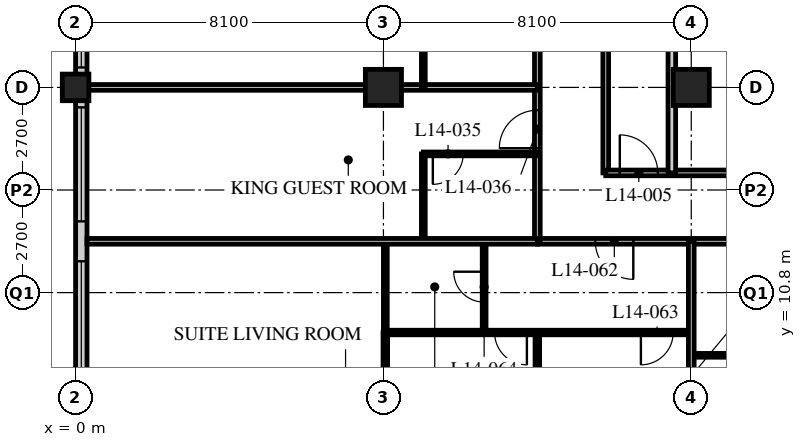
"""IFC4 building model, lengths in metres.
Left out: names, types, materials, properties, quantities, classifications, styles, units other than length and angle.
Written with IfcOpenShell. Run it as: python <this file> out.ifc"""

import sys

from ifc_helpers import new_model, si_unit, direction, frame, frame_2d, origin, origin_2d, place, context, subcontext, project, spatial, rectangle, hollow_rectangle, extrude, element, fill, save


model = new_model("IFC4")
c1 = context("Model", 3, precision=1e-05, world=origin(), true_north=direction((0.0, 1.0)))
c2 = subcontext(c1, "Body", "Model", "MODEL_VIEW")
j1 = project(units=[si_unit("LENGTHUNIT", "METRE"), si_unit("PLANEANGLEUNIT", "RADIAN")], contexts=[c1])
p1 = place(None, origin())
s1 = spatial("IfcSite", under=j1, at=p1, CompositionType="ELEMENT")
p2 = place(p1, origin())
s2 = spatial("IfcBuilding", under=s1, at=p2, CompositionType="ELEMENT")
p3 = place(p2, frame((0.0, 0.0, 60.2)))
s3 = spatial("IfcBuildingStorey", under=s2, at=p3, CompositionType="ELEMENT", Elevation=60.2)
p4 = place(p3, frame((0.0, 16.2, 0.0), z_axis=(0.0, 0.0, 1.0), x_axis=(1.0, 0.0, 0.0)))
e1 = element("IfcColumn", 1, at=p4, inside=s3, PredefinedType="COLUMN", context=c2, shape_type="SweptSolid", body=[
    extrude(hollow_rectangle(XDim=0.7, YDim=0.7, WallThickness=0.06, at=origin_2d()), origin(), (0.0, 0.0, 1.0), 3.4),
])
for number, where, z_axis, x_axis in (
    (2, (8.1, 16.2, 0.0), (0.0, 0.0, 1.0), (1.0, 0.0, 0.0)),
    (3, (16.2, 16.2, 0.0), (0.0, 0.0, 1.0), (1.0, 0.0, 0.0)),
):
    element("IfcColumn", number, at=place(p3, frame(where, z_axis=z_axis, x_axis=x_axis)), inside=s3, PredefinedType="COLUMN", context=c2, shape_type="SweptSolid", body=[
        extrude(hollow_rectangle(XDim=0.95, YDim=0.95, WallThickness=0.095, at=origin_2d()), origin(), (0.0, 0.0, 1.0), 3.4),
    ])
p5 = place(p3, frame((0.15, 40.2, 0.0), z_axis=(0.0, 0.0, 1.0), x_axis=(0.0, -1.0, 0.0)))
e4 = element("IfcWall", 4, at=p5, inside=s3, PredefinedType="SOLIDWALL", context=c2, shape_type="SweptSolid", body=[
    extrude(rectangle(XDim=32.1, YDim=0.3, at=frame_2d((16.05, 0.0))), origin(), (0.0, 0.0, 1.0), 3.19),
])
p6 = place(p5, frame((0.225, 0.0, 0.9)))
e5 = element("IfcOpeningElement", 5, at=p6, cuts=e4, PredefinedType="OPENING", context=c2, shape_type="SweptSolid", body=[
    extrude(rectangle(XDim=3.0, YDim=2.0, at=frame_2d((1.5, 1.0))), frame((0.0, 0.16, 0.0), z_axis=(0.0, -1.0, 0.0), x_axis=(1.0, 0.0, 0.0)), (0.0, 0.0, 1.0), 0.32),
])
p7 = place(p5, frame((4.275, 0.0, 0.9)))
e6 = element("IfcOpeningElement", 6, at=p7, cuts=e4, PredefinedType="OPENING", context=c2, shape_type="SweptSolid", body=[
    extrude(rectangle(XDim=3.0, YDim=2.0, at=frame_2d((1.5, 1.0))), frame((0.0, 0.16, 0.0), z_axis=(0.0, -1.0, 0.0), x_axis=(1.0, 0.0, 0.0)), (0.0, 0.0, 1.0), 0.32),
])
p8 = place(p5, frame((8.325, 0.0, 0.9)))
e7 = element("IfcOpeningElement", 7, at=p8, cuts=e4, PredefinedType="OPENING", context=c2, shape_type="SweptSolid", body=[
    extrude(rectangle(XDim=3.0, YDim=2.0, at=frame_2d((1.5, 1.0))), frame((0.0, 0.16, 0.0), z_axis=(0.0, -1.0, 0.0), x_axis=(1.0, 0.0, 0.0)), (0.0, 0.0, 1.0), 0.32),
])
p9 = place(p5, frame((12.375, 0.0, 0.9)))
e8 = element("IfcOpeningElement", 8, at=p9, cuts=e4, PredefinedType="OPENING", context=c2, shape_type="SweptSolid", body=[
    extrude(rectangle(XDim=3.0, YDim=2.0, at=frame_2d((1.5, 1.0))), frame((0.0, 0.16, 0.0), z_axis=(0.0, -1.0, 0.0), x_axis=(1.0, 0.0, 0.0)), (0.0, 0.0, 1.0), 0.32),
])
p10 = place(p5, frame((16.425, 0.0, 0.9)))
e9 = element("IfcOpeningElement", 9, at=p10, cuts=e4, PredefinedType="OPENING", context=c2, shape_type="SweptSolid", body=[
    extrude(rectangle(XDim=3.0, YDim=2.0, at=frame_2d((1.5, 1.0))), frame((0.0, 0.16, 0.0), z_axis=(0.0, -1.0, 0.0), x_axis=(1.0, 0.0, 0.0)), (0.0, 0.0, 1.0), 0.32),
])
p11 = place(p5, frame((20.475, 0.0, 0.9)))
e10 = element("IfcOpeningElement", 10, at=p11, cuts=e4, PredefinedType="OPENING", context=c2, shape_type="SweptSolid", body=[
    extrude(rectangle(XDim=3.0, YDim=2.0, at=frame_2d((1.5, 1.0))), frame((0.0, 0.16, 0.0), z_axis=(0.0, -1.0, 0.0), x_axis=(1.0, 0.0, 0.0)), (0.0, 0.0, 1.0), 0.32),
])
p12 = place(p5, frame((24.525, 0.0, 0.9)))
e11 = element("IfcOpeningElement", 11, at=p12, cuts=e4, PredefinedType="OPENING", context=c2, shape_type="SweptSolid", body=[
    extrude(rectangle(XDim=3.0, YDim=2.0, at=frame_2d((1.5, 1.0))), frame((0.0, 0.16, 0.0), z_axis=(0.0, -1.0, 0.0), x_axis=(1.0, 0.0, 0.0)), (0.0, 0.0, 1.0), 0.32),
])
p13 = place(p5, frame((28.575, 0.0, 0.9)))
e12 = element("IfcOpeningElement", 12, at=p13, cuts=e4, PredefinedType="OPENING", context=c2, shape_type="SweptSolid", body=[
    extrude(rectangle(XDim=3.0, YDim=2.0, at=frame_2d((1.5, 1.0))), frame((0.0, 0.16, 0.0), z_axis=(0.0, -1.0, 0.0), x_axis=(1.0, 0.0, 0.0)), (0.0, 0.0, 1.0), 0.32),
])
p14 = place(p3, frame((12.15, 12.15, 0.0), z_axis=(0.0, 0.0, 1.0), x_axis=(1.0, 0.0, 0.0)))
e13 = element("IfcWall", 13, at=p14, inside=s3, PredefinedType="PARTITIONING", context=c2, shape_type="SweptSolid", body=[
    extrude(rectangle(XDim=32.4, YDim=0.15, at=frame_2d((16.2, 0.0))), origin(), (0.0, 0.0, 1.0), 3.19),
])
p15 = place(p14, frame((6.5, 0.0, 0.0)))
e14 = element("IfcOpeningElement", 14, at=p15, cuts=e13, PredefinedType="OPENING", context=c2, shape_type="SweptSolid", body=[
    extrude(rectangle(XDim=1.0, YDim=2.1, at=frame_2d((0.5, 1.05))), frame((0.0, 0.085, 0.0), z_axis=(0.0, -1.0, 0.0), x_axis=(1.0, 0.0, 0.0)), (0.0, 0.0, 1.0), 0.17),
])
p16 = place(p14, frame((8.4, 0.0, 0.0)))
e15 = element("IfcOpeningElement", 15, at=p16, cuts=e13, PredefinedType="OPENING", context=c2, shape_type="SweptSolid", body=[
    extrude(rectangle(XDim=1.0, YDim=2.1, at=frame_2d((0.5, 1.05))), frame((0.0, 0.085, 0.0), z_axis=(0.0, -1.0, 0.0), x_axis=(1.0, 0.0, 0.0)), (0.0, 0.0, 1.0), 0.17),
])
p17 = place(p14, frame((14.6, 0.0, 0.0)))
e16 = element("IfcOpeningElement", 16, at=p17, cuts=e13, PredefinedType="OPENING", context=c2, shape_type="SweptSolid", body=[
    extrude(rectangle(XDim=1.0, YDim=2.1, at=frame_2d((0.5, 1.05))), frame((0.0, 0.085, 0.0), z_axis=(0.0, -1.0, 0.0), x_axis=(1.0, 0.0, 0.0)), (0.0, 0.0, 1.0), 0.17),
])
p18 = place(p14, frame((18.65, 0.0, 0.0)))
e17 = element("IfcOpeningElement", 17, at=p18, cuts=e13, PredefinedType="OPENING", context=c2, shape_type="SweptSolid", body=[
    extrude(rectangle(XDim=1.0, YDim=2.1, at=frame_2d((0.5, 1.05))), frame((0.0, 0.085, 0.0), z_axis=(0.0, -1.0, 0.0), x_axis=(1.0, 0.0, 0.0)), (0.0, 0.0, 1.0), 0.17),
])
p19 = place(p14, frame((20.55, 0.0, 0.0)))
e18 = element("IfcOpeningElement", 18, at=p19, cuts=e13, PredefinedType="OPENING", context=c2, shape_type="SweptSolid", body=[
    extrude(rectangle(XDim=1.0, YDim=2.1, at=frame_2d((0.5, 1.05))), frame((0.0, 0.085, 0.0), z_axis=(0.0, -1.0, 0.0), x_axis=(1.0, 0.0, 0.0)), (0.0, 0.0, 1.0), 0.17),
])
p20 = place(p14, frame((26.75, 0.0, 0.0)))
e19 = element("IfcOpeningElement", 19, at=p20, cuts=e13, PredefinedType="OPENING", context=c2, shape_type="SweptSolid", body=[
    extrude(rectangle(XDim=1.0, YDim=2.1, at=frame_2d((0.5, 1.05))), frame((0.0, 0.085, 0.0), z_axis=(0.0, -1.0, 0.0), x_axis=(1.0, 0.0, 0.0)), (0.0, 0.0, 1.0), 0.17),
])
p21 = place(p14, frame((1.525, 0.0, 0.0)))
e20 = element("IfcOpeningElement", 20, at=p21, cuts=e13, PredefinedType="OPENING", context=c2, shape_type="SweptSolid", body=[
    extrude(rectangle(XDim=1.0, YDim=2.1, at=frame_2d((0.5, 1.05))), frame((0.0, 0.085, 0.0), z_axis=(0.0, -1.0, 0.0), x_axis=(1.0, 0.0, 0.0)), (0.0, 0.0, 1.0), 0.17),
])
p22 = place(p14, frame((29.875, 0.0, 0.0)))
e21 = element("IfcOpeningElement", 21, at=p22, cuts=e13, PredefinedType="OPENING", context=c2, shape_type="SweptSolid", body=[
    extrude(rectangle(XDim=1.0, YDim=2.1, at=frame_2d((0.5, 1.05))), frame((0.0, 0.085, 0.0), z_axis=(0.0, -1.0, 0.0), x_axis=(1.0, 0.0, 0.0)), (0.0, 0.0, 1.0), 0.17),
])
p23 = place(p3, frame((12.15, 12.15, 0.0), z_axis=(0.0, 0.0, 1.0), x_axis=(0.0, 1.0, 0.0)))
e22 = element("IfcWall", 22, at=p23, inside=s3, PredefinedType="PARTITIONING", context=c2, shape_type="SweptSolid", body=[
    extrude(rectangle(XDim=30.15, YDim=0.15, at=frame_2d((15.075, 0.0))), origin(), (0.0, 0.0, 1.0), 3.19),
])
p24 = place(p23, frame((2.45, 0.0, 0.0)))
e23 = element("IfcOpeningElement", 23, at=p24, cuts=e22, PredefinedType="OPENING", context=c2, shape_type="SweptSolid", body=[
    extrude(rectangle(XDim=1.0, YDim=2.1, at=frame_2d((0.5, 1.05))), frame((0.0, 0.085, 0.0), z_axis=(0.0, -1.0, 0.0), x_axis=(1.0, 0.0, 0.0)), (0.0, 0.0, 1.0), 0.17),
])
p25 = place(p23, frame((6.5, 0.0, 0.0)))
e24 = element("IfcOpeningElement", 24, at=p25, cuts=e22, PredefinedType="OPENING", context=c2, shape_type="SweptSolid", body=[
    extrude(rectangle(XDim=1.0, YDim=2.1, at=frame_2d((0.5, 1.05))), frame((0.0, 0.085, 0.0), z_axis=(0.0, -1.0, 0.0), x_axis=(1.0, 0.0, 0.0)), (0.0, 0.0, 1.0), 0.17),
])
p26 = place(p23, frame((10.55, 0.0, 0.0)))
e25 = element("IfcOpeningElement", 25, at=p26, cuts=e22, PredefinedType="OPENING", context=c2, shape_type="SweptSolid", body=[
    extrude(rectangle(XDim=1.0, YDim=2.1, at=frame_2d((0.5, 1.05))), frame((0.0, 0.085, 0.0), z_axis=(0.0, -1.0, 0.0), x_axis=(1.0, 0.0, 0.0)), (0.0, 0.0, 1.0), 0.17),
])
p27 = place(p23, frame((14.6, 0.0, 0.0)))
e26 = element("IfcOpeningElement", 26, at=p27, cuts=e22, PredefinedType="OPENING", context=c2, shape_type="SweptSolid", body=[
    extrude(rectangle(XDim=1.0, YDim=2.1, at=frame_2d((0.5, 1.05))), frame((0.0, 0.085, 0.0), z_axis=(0.0, -1.0, 0.0), x_axis=(1.0, 0.0, 0.0)), (0.0, 0.0, 1.0), 0.17),
])
p28 = place(p23, frame((21.65, 0.0, 0.0)))
e27 = element("IfcOpeningElement", 27, at=p28, cuts=e22, PredefinedType="OPENING", context=c2, shape_type="SweptSolid", body=[
    extrude(rectangle(XDim=1.0, YDim=2.1, at=frame_2d((0.5, 1.05))), frame((0.0, 0.085, 0.0), z_axis=(0.0, -1.0, 0.0), x_axis=(1.0, 0.0, 0.0)), (0.0, 0.0, 1.0), 0.17),
])
p29 = place(p23, frame((26.7, 0.0, 0.0)))
e28 = element("IfcOpeningElement", 28, at=p29, cuts=e22, PredefinedType="OPENING", context=c2, shape_type="SweptSolid", body=[
    extrude(rectangle(XDim=1.0, YDim=2.1, at=frame_2d((0.5, 1.05))), frame((0.0, 0.085, 0.0), z_axis=(0.0, -1.0, 0.0), x_axis=(1.0, 0.0, 0.0)), (0.0, 0.0, 1.0), 0.17),
])
p30 = place(p3, frame((13.95, 40.5, 0.0), z_axis=(0.0, 0.0, 1.0), x_axis=(0.0, -1.0, 0.0)))
e29 = element("IfcWall", 29, at=p30, inside=s3, PredefinedType="PARTITIONING", context=c2, shape_type="SweptSolid", body=[
    extrude(rectangle(XDim=26.55, YDim=0.15, at=frame_2d((13.275, 0.0))), origin(), (0.0, 0.0, 1.0), 3.19),
])
p31 = place(p30, frame((11.65, 0.0, 0.0)))
e30 = element("IfcOpeningElement", 30, at=p31, cuts=e29, PredefinedType="OPENING", context=c2, shape_type="SweptSolid", body=[
    extrude(rectangle(XDim=1.0, YDim=2.1, at=frame_2d((0.5, 1.05))), frame((0.0, 0.085, 0.0), z_axis=(0.0, -1.0, 0.0), x_axis=(1.0, 0.0, 0.0)), (0.0, 0.0, 1.0), 0.17),
])
p32 = place(p30, frame((3.55, 0.0, 0.0)))
e31 = element("IfcOpeningElement", 31, at=p32, cuts=e29, PredefinedType="OPENING", context=c2, shape_type="SweptSolid", body=[
    extrude(rectangle(XDim=1.0, YDim=2.1, at=frame_2d((0.5, 1.05))), frame((0.0, 0.085, 0.0), z_axis=(0.0, -1.0, 0.0), x_axis=(1.0, 0.0, 0.0)), (0.0, 0.0, 1.0), 0.17),
])
p33 = place(p3, frame((13.95, 13.95, 0.0), z_axis=(0.0, 0.0, 1.0), x_axis=(1.0, 0.0, 0.0)))
e32 = element("IfcWall", 32, at=p33, inside=s3, PredefinedType="PARTITIONING", context=c2, shape_type="SweptSolid", body=[
    extrude(rectangle(XDim=13.19, YDim=0.15, at=frame_2d((6.595, 0.0))), origin(), (0.0, 0.0, 1.0), 3.19),
])
p34 = place(p33, frame((0.37, 0.0, 0.0)))
e33 = element("IfcOpeningElement", 33, at=p34, cuts=e32, PredefinedType="OPENING", context=c2, shape_type="SweptSolid", body=[
    extrude(rectangle(XDim=1.0, YDim=2.1, at=frame_2d((0.5, 1.05))), frame((0.0, 0.085, 0.0), z_axis=(0.0, -1.0, 0.0), x_axis=(1.0, 0.0, 0.0)), (0.0, 0.0, 1.0), 0.17),
])
p35 = place(p33, frame((4.104, 0.0, 0.0)))
e34 = element("IfcOpeningElement", 34, at=p35, cuts=e32, PredefinedType="OPENING", context=c2, shape_type="SweptSolid", body=[
    extrude(rectangle(XDim=1.0, YDim=2.1, at=frame_2d((0.5, 1.05))), frame((0.0, 0.085, 0.0), z_axis=(0.0, -1.0, 0.0), x_axis=(1.0, 0.0, 0.0)), (0.0, 0.0, 1.0), 0.17),
])
p36 = place(p33, frame((9.835, 0.0, 0.0)))
e35 = element("IfcOpeningElement", 35, at=p36, cuts=e32, PredefinedType="OPENING", context=c2, shape_type="SweptSolid", body=[
    extrude(rectangle(XDim=1.0, YDim=2.1, at=frame_2d((0.5, 1.05))), frame((0.0, 0.085, 0.0), z_axis=(0.0, -1.0, 0.0), x_axis=(1.0, 0.0, 0.0)), (0.0, 0.0, 1.0), 0.17),
])
p37 = place(p3, frame((15.689, 13.95, 0.0), z_axis=(0.0, 0.0, 1.0), x_axis=(0.0, 1.0, 0.0)))
e36 = element("IfcWall", 36, at=p37, inside=s3, PredefinedType="SOLIDWALL", context=c2, shape_type="SweptSolid", body=[
    extrude(rectangle(XDim=10.35, YDim=0.2, at=frame_2d((5.175, 0.0))), origin(), (0.0, 0.0, 1.0), 3.19),
])
for number, where, z_axis, x_axis in (
    (37, (16.2, 9.15, 0.0), (0.0, 0.0, 1.0), (1.0, 0.0, 0.0)),
    (38, (9.15, 12.15, 0.0), (0.0, 0.0, 1.0), (0.0, 1.0, 0.0)),
):
    element("IfcWall", number, at=place(p3, frame(where, z_axis=z_axis, x_axis=x_axis)), inside=s3, PredefinedType="PARTITIONING", context=c2, shape_type="SweptSolid", body=[
        extrude(rectangle(XDim=2.3, YDim=0.1, at=frame_2d((1.15, 0.0))), origin(), (0.0, 0.0, 1.0), 3.19),
    ])
p38 = place(p3, frame((12.15, 14.45, 0.0), z_axis=(0.0, 0.0, 1.0), x_axis=(-1.0, 0.0, 0.0)))
e39 = element("IfcWall", 39, at=p38, inside=s3, PredefinedType="PARTITIONING", context=c2, shape_type="SweptSolid", body=[
    extrude(rectangle(XDim=3.0, YDim=0.1, at=frame_2d((1.5, 0.0))), origin(), (0.0, 0.0, 1.0), 3.19),
])
p39 = place(p38, frame((1.95, 0.0, 0.0)))
e40 = element("IfcOpeningElement", 40, at=p39, cuts=e39, PredefinedType="OPENING", context=c2, shape_type="SweptSolid", body=[
    extrude(rectangle(XDim=0.8, YDim=2.1, at=frame_2d((0.4, 1.05))), frame((0.0, 0.06, 0.0), z_axis=(0.0, -1.0, 0.0), x_axis=(1.0, 0.0, 0.0)), (0.0, 0.0, 1.0), 0.12),
])
p40 = place(p3, frame((12.15, 16.2, 0.0), z_axis=(0.0, 0.0, 1.0), x_axis=(-1.0, 0.0, 0.0)))
e41 = element("IfcWall", 41, at=p40, inside=s3, PredefinedType="PARTITIONING", context=c2, shape_type="SweptSolid", body=[
    extrude(rectangle(XDim=11.85, YDim=0.15, at=frame_2d((5.925, 0.0))), origin(), (0.0, 0.0, 1.0), 2.578),
])
p41 = place(p3, frame((9.15, 16.2, 0.0), z_axis=(0.0, 0.0, 1.0), x_axis=(0.0, 1.0, 0.0)))
e42 = element("IfcWall", 42, at=p41, inside=s3, PredefinedType="PARTITIONING", context=c2, shape_type="SweptSolid", body=[
    extrude(rectangle(XDim=2.3, YDim=0.1, at=frame_2d((1.15, 0.0))), origin(), (0.0, 0.0, 1.0), 3.19),
])
p42 = place(p3, frame((10.75, 12.15, 0.0), z_axis=(0.0, 0.0, 1.0), x_axis=(0.0, -1.0, 0.0)))
e43 = element("IfcWall", 43, at=p42, inside=s3, PredefinedType="PARTITIONING", context=c2, shape_type="SweptSolid", body=[
    extrude(rectangle(XDim=2.4, YDim=0.1, at=frame_2d((1.2, 0.0))), origin(), (0.0, 0.0, 1.0), 3.19),
])
p43 = place(p42, frame((0.8, 0.0, 0.0)))
e44 = element("IfcOpeningElement", 44, at=p43, cuts=e43, PredefinedType="OPENING", context=c2, shape_type="SweptSolid", body=[
    extrude(rectangle(XDim=0.8, YDim=2.1, at=frame_2d((0.4, 1.05))), frame((0.0, 0.06, 0.0), z_axis=(0.0, -1.0, 0.0), x_axis=(1.0, 0.0, 0.0)), (0.0, 0.0, 1.0), 0.12),
])
p44 = place(p3, frame((8.15, 12.15, 0.0), z_axis=(0.0, 0.0, 1.0), x_axis=(0.0, -1.0, 0.0)))
e45 = element("IfcWall", 45, at=p44, inside=s3, PredefinedType="PARTITIONING", context=c2, shape_type="SweptSolid", body=[
    extrude(rectangle(XDim=2.4, YDim=0.1, at=frame_2d((1.2, 0.0))), origin(), (0.0, 0.0, 1.0), 2.578),
])
p45 = place(p3, frame((8.15, 9.75, 0.0), z_axis=(0.0, 0.0, 1.0), x_axis=(1.0, 0.0, 0.0)))
e46 = element("IfcWall", 46, at=p45, inside=s3, PredefinedType="PARTITIONING", context=c2, shape_type="SweptSolid", body=[
    extrude(rectangle(XDim=8.05, YDim=0.12, at=frame_2d((4.025, 0.0))), origin(), (0.0, 0.0, 1.0), 3.19),
])
p46 = place(p45, frame((6.725, 0.0, 0.0)))
e47 = element("IfcOpeningElement", 47, at=p46, cuts=e46, PredefinedType="OPENING", context=c2, shape_type="SweptSolid", body=[
    extrude(rectangle(XDim=0.85, YDim=2.1, at=frame_2d((0.425, 1.05))), frame((0.0, 0.07, 0.0), z_axis=(0.0, -1.0, 0.0), x_axis=(1.0, 0.0, 0.0)), (0.0, 0.0, 1.0), 0.14),
])
p47 = place(p45, frame((2.875, 0.0, 0.0)))
e48 = element("IfcOpeningElement", 48, at=p47, cuts=e46, PredefinedType="OPENING", context=c2, shape_type="SweptSolid", body=[
    extrude(rectangle(XDim=0.85, YDim=2.1, at=frame_2d((0.425, 1.05))), frame((0.0, 0.07, 0.0), z_axis=(0.0, -1.0, 0.0), x_axis=(1.0, 0.0, 0.0)), (0.0, 0.0, 1.0), 0.14),
])
p48 = place(p3, frame((12.15, 9.75, 0.0), z_axis=(0.0, 0.0, 1.0), x_axis=(0.0, -1.0, 0.0)))
e49 = element("IfcWall", 49, at=p48, inside=s3, PredefinedType="PARTITIONING", context=c2, shape_type="SweptSolid", body=[
    extrude(rectangle(XDim=9.45, YDim=0.12, at=frame_2d((4.725, 0.0))), origin(), (0.0, 0.0, 1.0), 3.19),
])
p49 = place(p3, frame((0.3, 12.15, 0.0), z_axis=(0.0, 0.0, 1.0), x_axis=(1.0, 0.0, 0.0)))
e50 = element("IfcWall", 50, at=p49, inside=s3, PredefinedType="PARTITIONING", context=c2, shape_type="SweptSolid", body=[
    extrude(rectangle(XDim=11.85, YDim=0.15, at=frame_2d((5.925, 0.0))), origin(), (0.0, 0.0, 1.0), 3.19),
])
p50 = place(p3, frame((16.2, 12.15, 0.0), z_axis=(0.0, 0.0, 1.0), x_axis=(0.0, -1.0, 0.0)))
e51 = element("IfcWall", 51, at=p50, inside=s3, PredefinedType="PARTITIONING", context=c2, shape_type="SweptSolid", body=[
    extrude(rectangle(XDim=11.85, YDim=0.15, at=frame_2d((5.925, 0.0))), origin(), (0.0, 0.0, 1.0), 2.578),
])
p51 = place(p3, frame((8.15, 9.75, 0.0), z_axis=(0.0, 0.0, 1.0), x_axis=(0.0, -1.0, 0.0)))
e52 = element("IfcWall", 52, at=p51, inside=s3, PredefinedType="PARTITIONING", context=c2, shape_type="SweptSolid", body=[
    extrude(rectangle(XDim=1.175, YDim=0.12, at=frame_2d((0.587, 0.0))), origin(), (0.0, 0.0, 1.0), 2.578),
])
p52 = place(p11, origin())
e53 = element("IfcWindow", 53, at=p52, inside=s3, PartitioningType="SINGLE_PANEL", PredefinedType="WINDOW", context=c2, shape_type="SweptSolid", body=[
    extrude(rectangle(XDim=3.0, YDim=2.0, at=frame_2d((1.5, 1.0))), frame((0.0, 0.03, 0.0), z_axis=(0.0, -1.0, 0.0), x_axis=(1.0, 0.0, 0.0)), (0.0, 0.0, 1.0), 0.06),
])
fill(e10, e53)
p53 = place(p12, origin())
e54 = element("IfcWindow", 54, at=p53, inside=s3, PartitioningType="SINGLE_PANEL", PredefinedType="WINDOW", context=c2, shape_type="SweptSolid", body=[
    extrude(rectangle(XDim=3.0, YDim=2.0, at=frame_2d((1.5, 1.0))), frame((0.0, 0.03, 0.0), z_axis=(0.0, -1.0, 0.0), x_axis=(1.0, 0.0, 0.0)), (0.0, 0.0, 1.0), 0.06),
])
fill(e11, e54)
p54 = place(p13, origin())
e55 = element("IfcWindow", 55, at=p54, inside=s3, PartitioningType="SINGLE_PANEL", PredefinedType="WINDOW", context=c2, shape_type="SweptSolid", body=[
    extrude(rectangle(XDim=3.0, YDim=2.0, at=frame_2d((1.5, 1.0))), frame((0.0, 0.03, 0.0), z_axis=(0.0, -1.0, 0.0), x_axis=(1.0, 0.0, 0.0)), (0.0, 0.0, 1.0), 0.06),
])
fill(e12, e55)
p55 = place(p34, origin())
e56 = element("IfcDoor", 56, at=p55, inside=s3, OperationType="SINGLE_SWING_LEFT", PredefinedType="DOOR", context=c2, shape_type="SweptSolid", body=[
    extrude(rectangle(XDim=1.0, YDim=2.1, at=frame_2d((0.5, 1.05))), frame((0.0, 0.025, 0.0), z_axis=(0.0, -1.0, 0.0), x_axis=(1.0, 0.0, 0.0)), (0.0, 0.0, 1.0), 0.05),
])
fill(e33, e56)
p56 = place(p39, origin())
e57 = element("IfcDoor", 57, at=p56, inside=s3, OperationType="SINGLE_SWING_RIGHT", PredefinedType="DOOR", context=c2, shape_type="SweptSolid", body=[
    extrude(rectangle(XDim=0.8, YDim=2.1, at=frame_2d((0.4, 1.05))), frame((0.0, 0.025, 0.0), z_axis=(0.0, -1.0, 0.0), x_axis=(1.0, 0.0, 0.0)), (0.0, 0.0, 1.0), 0.05),
])
fill(e40, e57)
p57 = place(p24, origin())
e58 = element("IfcDoor", 58, at=p57, inside=s3, OperationType="SINGLE_SWING_LEFT", PredefinedType="DOOR", context=c2, shape_type="SweptSolid", body=[
    extrude(rectangle(XDim=1.0, YDim=2.1, at=frame_2d((0.5, 1.05))), frame((0.0, 0.025, 0.0), z_axis=(0.0, -1.0, 0.0), x_axis=(1.0, 0.0, 0.0)), (0.0, 0.0, 1.0), 0.05),
])
fill(e23, e58)
p58 = place(p21, origin())
e59 = element("IfcDoor", 59, at=p58, inside=s3, OperationType="SINGLE_SWING_LEFT", PredefinedType="DOOR", context=c2, shape_type="SweptSolid", body=[
    extrude(rectangle(XDim=1.0, YDim=2.1, at=frame_2d((0.5, 1.05))), frame((0.0, 0.025, 0.0), z_axis=(0.0, -1.0, 0.0), x_axis=(1.0, 0.0, 0.0)), (0.0, 0.0, 1.0), 0.05),
])
fill(e20, e59)
p59 = place(p46, origin())
e60 = element("IfcDoor", 60, at=p59, inside=s3, OperationType="SINGLE_SWING_RIGHT", PredefinedType="DOOR", context=c2, shape_type="SweptSolid", body=[
    extrude(rectangle(XDim=0.85, YDim=2.1, at=frame_2d((0.425, 1.05))), frame((0.0, 0.025, 0.0), z_axis=(0.0, -1.0, 0.0), x_axis=(1.0, 0.0, 0.0)), (0.0, 0.0, 1.0), 0.05),
])
fill(e47, e60)
p60 = place(p43, origin())
e61 = element("IfcDoor", 61, at=p60, inside=s3, OperationType="SINGLE_SWING_RIGHT", PredefinedType="DOOR", context=c2, shape_type="SweptSolid", body=[
    extrude(rectangle(XDim=0.8, YDim=2.1, at=frame_2d((0.4, 1.05))), frame((0.0, 0.025, 0.0), z_axis=(0.0, -1.0, 0.0), x_axis=(1.0, 0.0, 0.0)), (0.0, 0.0, 1.0), 0.05),
])
fill(e44, e61)
p61 = place(p47, origin())
e62 = element("IfcDoor", 62, at=p61, inside=s3, OperationType="SINGLE_SWING_LEFT", PredefinedType="DOOR", context=c2, shape_type="SweptSolid", body=[
    extrude(rectangle(XDim=0.85, YDim=2.1, at=frame_2d((0.425, 1.05))), frame((0.0, 0.025, 0.0), z_axis=(0.0, -1.0, 0.0), x_axis=(1.0, 0.0, 0.0)), (0.0, 0.0, 1.0), 0.05),
])
fill(e48, e62)
save(model, sys.argv[1])
